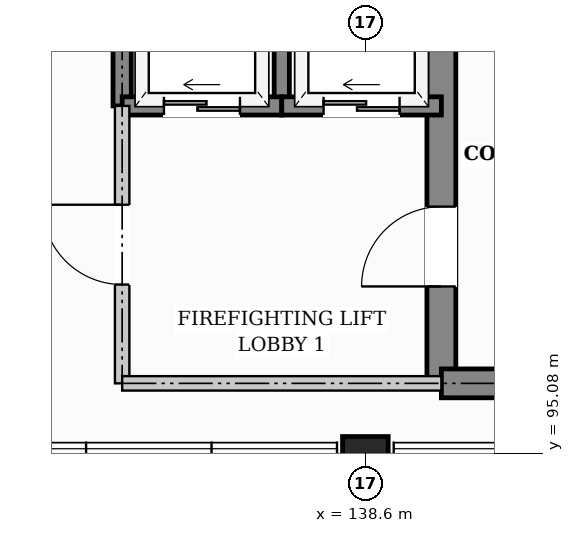
"""IFC4 building model, lengths in metres.
Left out: names, types, materials, properties, quantities, classifications, styles, units other than length and angle.
Written with IfcOpenShell. Run it as: python <this file> out.ifc"""

import sys

from ifc_helpers import new_model, si_unit, direction, frame, frame_2d, origin, origin_2d, place, context, subcontext, project, spatial, rectangle, extrude, element, fill, save


model = new_model("IFC4")
c1 = context("Model", 3, precision=1e-05, world=origin(), true_north=direction((0.0, 1.0)))
c2 = subcontext(c1, "Body", "Model", "MODEL_VIEW")
j1 = project(units=[si_unit("LENGTHUNIT", "METRE"), si_unit("PLANEANGLEUNIT", "RADIAN")], contexts=[c1])
p1 = place(None, origin())
s1 = spatial("IfcSite", under=j1, at=p1, CompositionType="ELEMENT")
p2 = place(p1, origin())
s2 = spatial("IfcBuilding", under=s1, at=p2, CompositionType="ELEMENT")
p3 = place(p2, frame((0.0, 0.0, 24.0)))
s3 = spatial("IfcBuildingStorey", under=s2, at=p3, CompositionType="ELEMENT", Elevation=24.0)
p4 = place(p3, frame((138.6, 95.0, 0.0), z_axis=(0.0, 0.0, 1.0), x_axis=(1.0, 0.0, 0.0)))
e1 = element("IfcColumn", 1, at=p4, inside=s3, PredefinedType="COLUMN", context=c2, shape_type="SweptSolid", body=[
    extrude(rectangle(XDim=0.6, YDim=0.6, at=origin_2d()), origin(), (0.0, 0.0, 1.0), 3.6),
])
p5 = place(p3, frame((139.6, 96.0, 0.0), z_axis=(0.0, 0.0, 1.0), x_axis=(0.0, 1.0, 0.0)))
e2 = element("IfcWall", 2, at=p5, inside=s3, PredefinedType="SHEAR", context=c2, shape_type="SweptSolid", body=[
    extrude(rectangle(XDim=6.0, YDim=0.38, at=frame_2d((3.0, 0.0))), origin(), (0.0, 0.0, 1.0), 3.34),
])
p6 = place(p5, frame((1.275, 0.0, 0.0)))
e3 = element("IfcOpeningElement", 3, at=p6, cuts=e2, PredefinedType="OPENING", context=c2, shape_type="SweptSolid", body=[
    extrude(rectangle(XDim=1.05, YDim=2.15, at=frame_2d((0.525, 1.075))), frame((0.0, 0.2, 0.0), z_axis=(0.0, -1.0, 0.0), x_axis=(1.0, 0.0, 0.0)), (0.0, 0.0, 1.0), 0.4),
])
p7 = place(p3, frame((139.6, 96.0, 0.0), z_axis=(0.0, 0.0, 1.0), x_axis=(1.0, 0.0, 0.0)))
e4 = element("IfcWall", 4, at=p7, inside=s3, PredefinedType="SHEAR", context=c2, shape_type="SweptSolid", body=[
    extrude(rectangle(XDim=7.0, YDim=0.38, at=frame_2d((3.5, 0.0))), origin(), (0.0, 0.0, 1.0), 3.34),
])
p8 = place(p3, frame((135.4, 99.65, 0.0), z_axis=(0.0, 0.0, 1.0), x_axis=(0.0, 1.0, 0.0)))
e5 = element("IfcWall", 5, at=p8, inside=s3, PredefinedType="SHEAR", context=c2, shape_type="SweptSolid", body=[
    extrude(rectangle(XDim=2.35, YDim=0.24, at=frame_2d((1.175, 0.0))), origin(), (0.0, 0.0, 1.0), 3.34),
])
p9 = place(p3, frame((137.5, 99.65, 0.0), z_axis=(0.0, 0.0, 1.0), x_axis=(0.0, 1.0, 0.0)))
e6 = element("IfcWall", 6, at=p9, inside=s3, PredefinedType="SHEAR", context=c2, shape_type="SweptSolid", body=[
    extrude(rectangle(XDim=2.35, YDim=0.2, at=frame_2d((1.175, 0.0))), origin(), (0.0, 0.0, 1.0), 3.34),
])
p10 = place(p3, frame((135.4, 99.65, 0.0), z_axis=(0.0, 0.0, 1.0), x_axis=(1.0, 0.0, 0.0)))
e7 = element("IfcWall", 7, at=p10, inside=s3, PredefinedType="SHEAR", context=c2, shape_type="SweptSolid", body=[
    extrude(rectangle(XDim=2.1, YDim=0.24, at=frame_2d((1.05, 0.0))), origin(), (0.0, 0.0, 1.0), 3.34),
])
p11 = place(p10, frame((0.55, 0.0, 0.0)))
e8 = element("IfcOpeningElement", 8, at=p11, cuts=e7, PredefinedType="OPENING", context=c2, shape_type="SweptSolid", body=[
    extrude(rectangle(XDim=1.0, YDim=2.1, at=frame_2d((0.5, 1.05))), frame((0.0, 0.13, 0.0), z_axis=(0.0, -1.0, 0.0), x_axis=(1.0, 0.0, 0.0)), (0.0, 0.0, 1.0), 0.26),
])
p12 = place(p3, frame((137.5, 99.65, 0.0), z_axis=(0.0, 0.0, 1.0), x_axis=(1.0, 0.0, 0.0)))
e9 = element("IfcWall", 9, at=p12, inside=s3, PredefinedType="SHEAR", context=c2, shape_type="SweptSolid", body=[
    extrude(rectangle(XDim=2.1, YDim=0.24, at=frame_2d((1.05, 0.0))), origin(), (0.0, 0.0, 1.0), 3.34),
])
p13 = place(p12, frame((0.55, 0.0, 0.0)))
e10 = element("IfcOpeningElement", 10, at=p13, cuts=e9, PredefinedType="OPENING", context=c2, shape_type="SweptSolid", body=[
    extrude(rectangle(XDim=1.0, YDim=2.1, at=frame_2d((0.5, 1.05))), frame((0.0, 0.13, 0.0), z_axis=(0.0, -1.0, 0.0), x_axis=(1.0, 0.0, 0.0)), (0.0, 0.0, 1.0), 0.26),
])
p14 = place(p3, frame((135.4, 96.0, 0.0), z_axis=(0.0, 0.0, 1.0), x_axis=(0.0, 1.0, 0.0)))
e11 = element("IfcWall", 11, at=p14, inside=s3, PredefinedType="PARTITIONING", context=c2, shape_type="SweptSolid", body=[
    extrude(rectangle(XDim=3.65, YDim=0.19, at=frame_2d((1.825, 0.0))), origin(), (0.0, 0.0, 1.0), 3.34),
])
p15 = place(p14, frame((1.3, 0.0, 0.0)))
e12 = element("IfcOpeningElement", 12, at=p15, cuts=e11, PredefinedType="OPENING", context=c2, shape_type="SweptSolid", body=[
    extrude(rectangle(XDim=1.05, YDim=2.15, at=frame_2d((0.525, 1.075))), frame((0.0, 0.105, 0.0), z_axis=(0.0, -1.0, 0.0), x_axis=(1.0, 0.0, 0.0)), (0.0, 0.0, 1.0), 0.21),
])
p16 = place(p3, frame((135.4, 96.0, 0.0), z_axis=(0.0, 0.0, 1.0), x_axis=(1.0, 0.0, 0.0)))
e13 = element("IfcWall", 13, at=p16, inside=s3, PredefinedType="PARTITIONING", context=c2, shape_type="SweptSolid", body=[
    extrude(rectangle(XDim=4.2, YDim=0.19, at=frame_2d((2.1, 0.0))), origin(), (0.0, 0.0, 1.0), 3.34),
])
p17 = place(p6, origin())
e14 = element("IfcDoor", 14, at=p17, inside=s3, OperationType="SINGLE_SWING_LEFT", PredefinedType="DOOR", context=c2, shape_type="SweptSolid", body=[
    extrude(rectangle(XDim=1.05, YDim=2.15, at=frame_2d((0.525, 1.075))), frame((0.0, 0.025, 0.0), z_axis=(0.0, -1.0, 0.0), x_axis=(1.0, 0.0, 0.0)), (0.0, 0.0, 1.0), 0.05),
])
fill(e3, e14)
p18 = place(p11, origin())
e15 = element("IfcDoor", 15, at=p18, inside=s3, OperationType="SLIDING_TO_LEFT", PredefinedType="DOOR", context=c2, shape_type="SweptSolid", body=[
    extrude(rectangle(XDim=1.0, YDim=2.1, at=frame_2d((0.5, 1.05))), frame((0.0, 0.025, 0.0), z_axis=(0.0, -1.0, 0.0), x_axis=(1.0, 0.0, 0.0)), (0.0, 0.0, 1.0), 0.05),
])
fill(e8, e15)
p19 = place(p13, origin())
e16 = element("IfcDoor", 16, at=p19, inside=s3, OperationType="SLIDING_TO_LEFT", PredefinedType="DOOR", context=c2, shape_type="SweptSolid", body=[
    extrude(rectangle(XDim=1.0, YDim=2.1, at=frame_2d((0.5, 1.05))), frame((0.0, 0.025, 0.0), z_axis=(0.0, -1.0, 0.0), x_axis=(1.0, 0.0, 0.0)), (0.0, 0.0, 1.0), 0.05),
])
fill(e10, e16)
p20 = place(p15, origin())
e17 = element("IfcDoor", 17, at=p20, inside=s3, OperationType="SINGLE_SWING_RIGHT", PredefinedType="DOOR", context=c2, shape_type="SweptSolid", body=[
    extrude(rectangle(XDim=1.05, YDim=2.15, at=frame_2d((0.525, 1.075))), frame((0.0, 0.025, 0.0), z_axis=(0.0, -1.0, 0.0), x_axis=(1.0, 0.0, 0.0)), (0.0, 0.0, 1.0), 0.05),
])
fill(e12, e17)
save(model, sys.argv[1])
